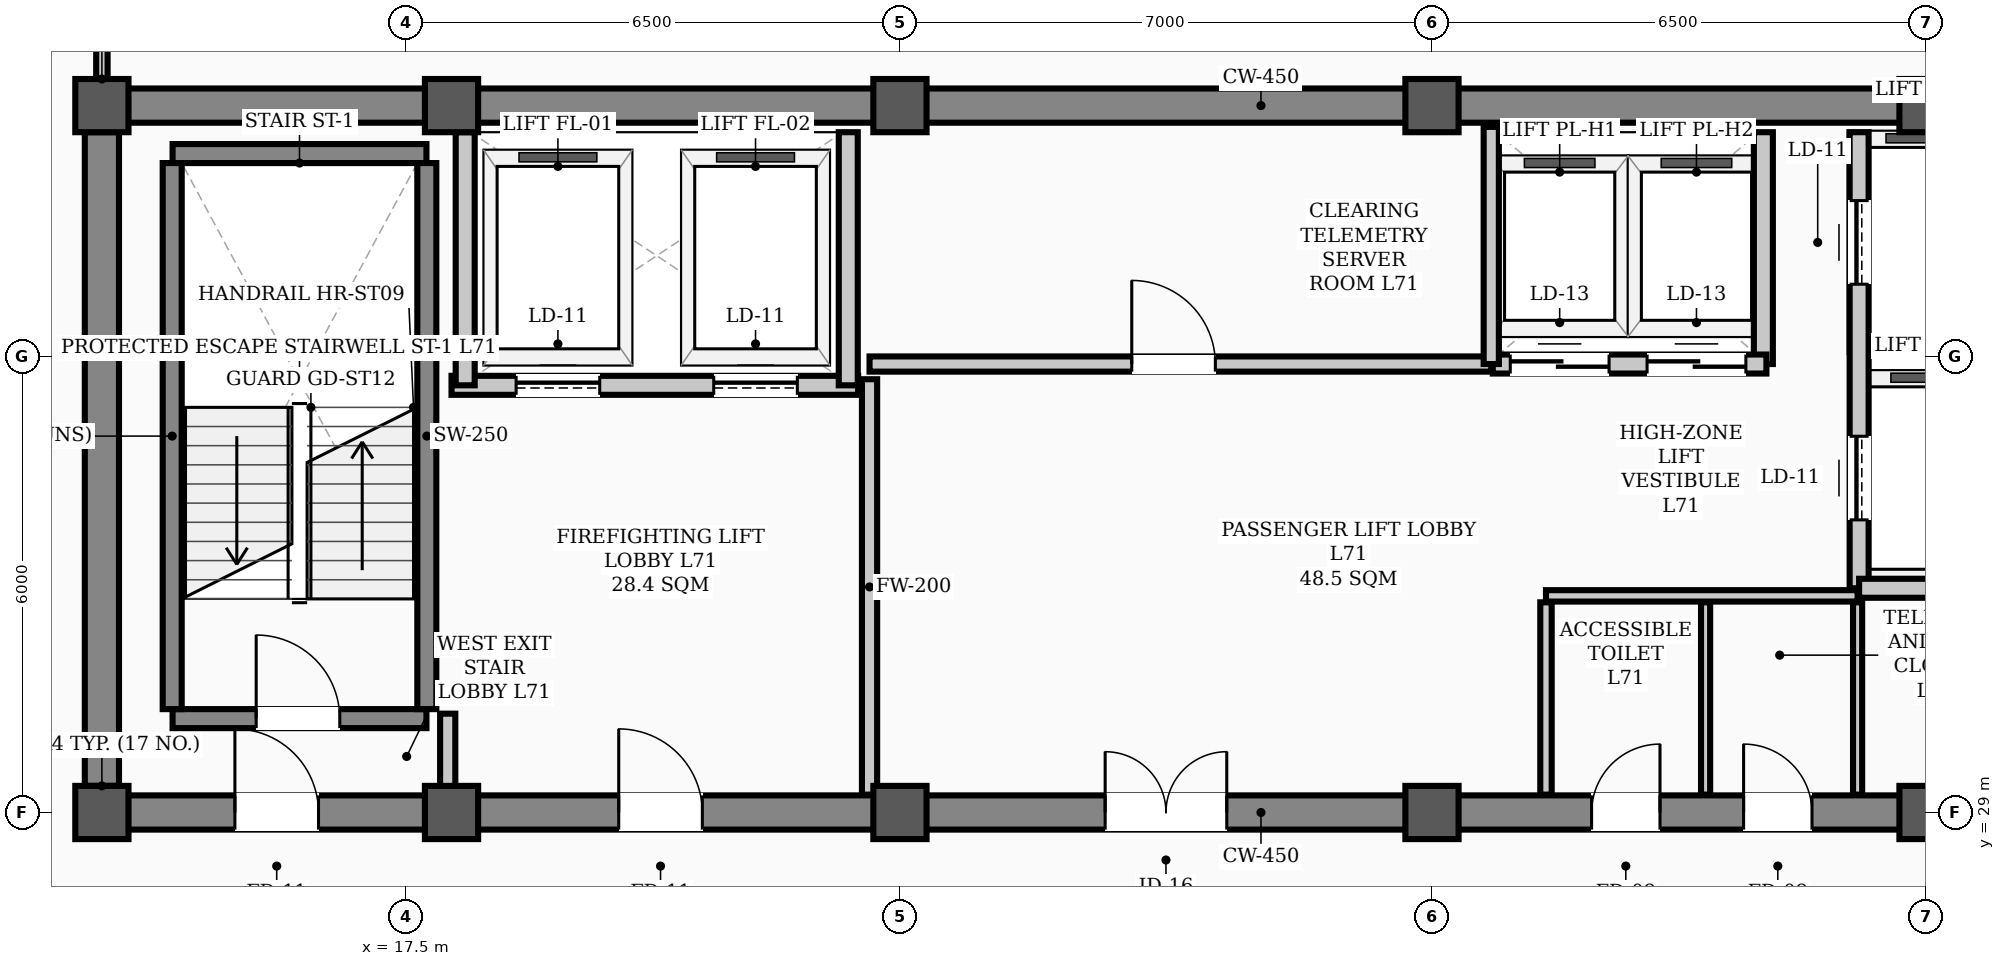
"""IFC4 building model, lengths in metres.
Left out: names, types, materials, properties, quantities, classifications, styles, units other than length and angle.
Written with IfcOpenShell. Run it as: python <this file> out.ifc"""

import sys

from ifc_helpers import new_model, si_unit, direction, frame, frame_2d, origin, origin_2d, place, context, subcontext, project, spatial, rectangle, hollow_rectangle, extrude, element, fill, save


model = new_model("IFC4")
c1 = context("Model", 3, precision=1e-05, world=origin(), true_north=direction((0.0, 1.0)))
c2 = subcontext(c1, "Body", "Model", "MODEL_VIEW")
j1 = project(units=[si_unit("LENGTHUNIT", "METRE"), si_unit("PLANEANGLEUNIT", "RADIAN")], contexts=[c1])
p1 = place(None, origin())
s1 = spatial("IfcSite", under=j1, at=p1, CompositionType="ELEMENT")
p2 = place(p1, origin())
s2 = spatial("IfcBuilding", under=s1, at=p2, CompositionType="ELEMENT")
p3 = place(p2, frame((0.0, 0.0, 285.2)))
s3 = spatial("IfcBuildingStorey", under=s2, at=p3, CompositionType="ELEMENT", Elevation=285.2)
for number, where, z_axis, x_axis in (
    (1, (13.5, 29.0, 0.0), (0.0, 0.0, 1.0), (1.0, 0.0, 0.0)),
    (2, (13.5, 38.3, 0.0), (0.0, 0.0, 1.0), (1.0, 0.0, 0.0)),
    (3, (18.1, 29.0, 0.0), (0.0, 0.0, 1.0), (1.0, 0.0, 0.0)),
    (4, (18.1, 38.3, 0.0), (0.0, 0.0, 1.0), (1.0, 0.0, 0.0)),
    (5, (24.0, 29.0, 0.0), (0.0, 0.0, 1.0), (1.0, 0.0, 0.0)),
    (6, (24.0, 38.3, 0.0), (0.0, 0.0, 1.0), (1.0, 0.0, 0.0)),
    (7, (31.0, 29.0, 0.0), (0.0, 0.0, 1.0), (1.0, 0.0, 0.0)),
    (8, (31.0, 38.3, 0.0), (0.0, 0.0, 1.0), (1.0, 0.0, 0.0)),
    (9, (37.5, 29.0, 0.0), (0.0, 0.0, 1.0), (1.0, 0.0, 0.0)),
    (10, (37.5, 38.3, 0.0), (0.0, 0.0, 1.0), (1.0, 0.0, 0.0)),
):
    element("IfcColumn", number, at=place(p3, frame(where, z_axis=z_axis, x_axis=x_axis)), inside=s3, PredefinedType="COLUMN", context=c2, shape_type="SweptSolid", body=[
        extrude(hollow_rectangle(XDim=0.7, YDim=0.7, WallThickness=0.028, InnerFilletRadius=0.014, OuterFilletRadius=0.042, at=origin_2d()), origin(), (0.0, 0.0, 1.0), 3.9),
    ])
p4 = place(p3, frame((13.5, 29.0, 0.0), z_axis=(0.0, 0.0, 1.0), x_axis=(1.0, 0.0, 0.0)))
e11 = element("IfcWall", 11, at=p4, inside=s3, PredefinedType="SHEAR", context=c2, shape_type="SweptSolid", body=[
    extrude(rectangle(XDim=30.5, YDim=0.45, at=frame_2d((15.25, 0.0))), origin(), (0.0, 0.0, 1.0), 3.72),
])
p5 = place(p4, frame((1.75, 0.0, 0.0)))
e12 = element("IfcOpeningElement", 12, at=p5, cuts=e11, PredefinedType="OPENING", context=c2, shape_type="SweptSolid", body=[
    extrude(rectangle(XDim=1.1, YDim=2.08, at=frame_2d((0.55, 1.04))), frame((0.0, 0.235, 0.0), z_axis=(0.0, -1.0, 0.0), x_axis=(1.0, 0.0, 0.0)), (0.0, 0.0, 1.0), 0.47),
])
p6 = place(p4, frame((26.7, 0.0, 0.0)))
e13 = element("IfcOpeningElement", 13, at=p6, cuts=e11, PredefinedType="OPENING", context=c2, shape_type="SweptSolid", body=[
    extrude(rectangle(XDim=1.1, YDim=2.08, at=frame_2d((0.55, 1.04))), frame((0.0, 0.235, 0.0), z_axis=(0.0, -1.0, 0.0), x_axis=(1.0, 0.0, 0.0)), (0.0, 0.0, 1.0), 0.47),
])
p7 = place(p4, frame((6.8, 0.0, 0.0)))
e14 = element("IfcOpeningElement", 14, at=p7, cuts=e11, PredefinedType="OPENING", context=c2, shape_type="SweptSolid", body=[
    extrude(rectangle(XDim=1.1, YDim=2.08, at=frame_2d((0.55, 1.04))), frame((0.0, 0.235, 0.0), z_axis=(0.0, -1.0, 0.0), x_axis=(1.0, 0.0, 0.0)), (0.0, 0.0, 1.0), 0.47),
])
p8 = place(p4, frame((13.2, 0.0, 0.0)))
e15 = element("IfcOpeningElement", 15, at=p8, cuts=e11, PredefinedType="OPENING", context=c2, shape_type="SweptSolid", body=[
    extrude(rectangle(XDim=1.6, YDim=2.08, at=frame_2d((0.8, 1.04))), frame((0.0, 0.235, 0.0), z_axis=(0.0, -1.0, 0.0), x_axis=(1.0, 0.0, 0.0)), (0.0, 0.0, 1.0), 0.47),
])
p9 = place(p4, frame((19.6, 0.0, 0.0)))
e16 = element("IfcOpeningElement", 16, at=p9, cuts=e11, PredefinedType="OPENING", context=c2, shape_type="SweptSolid", body=[
    extrude(rectangle(XDim=0.9, YDim=2.08, at=frame_2d((0.45, 1.04))), frame((0.0, 0.235, 0.0), z_axis=(0.0, -1.0, 0.0), x_axis=(1.0, 0.0, 0.0)), (0.0, 0.0, 1.0), 0.47),
])
p10 = place(p4, frame((21.6, 0.0, 0.0)))
e17 = element("IfcOpeningElement", 17, at=p10, cuts=e11, PredefinedType="OPENING", context=c2, shape_type="SweptSolid", body=[
    extrude(rectangle(XDim=0.9, YDim=2.08, at=frame_2d((0.45, 1.04))), frame((0.0, 0.235, 0.0), z_axis=(0.0, -1.0, 0.0), x_axis=(1.0, 0.0, 0.0)), (0.0, 0.0, 1.0), 0.47),
])
p11 = place(p3, frame((13.5, 38.3, 0.0), z_axis=(0.0, 0.0, 1.0), x_axis=(1.0, 0.0, 0.0)))
e18 = element("IfcWall", 18, at=p11, inside=s3, PredefinedType="SHEAR", context=c2, shape_type="SweptSolid", body=[
    extrude(rectangle(XDim=30.5, YDim=0.45, at=frame_2d((15.25, 0.0))), origin(), (0.0, 0.0, 1.0), 3.72),
])
p12 = place(p3, frame((13.5, 29.35, 0.0), z_axis=(0.0, 0.0, 1.0), x_axis=(0.0, 1.0, 0.0)))
e19 = element("IfcWall", 19, at=p12, inside=s3, PredefinedType="SHEAR", context=c2, shape_type="SweptSolid", body=[
    extrude(rectangle(XDim=8.6, YDim=0.45, at=frame_2d((4.3, 0.0))), origin(), (0.0, 0.0, 1.0), 3.72),
])
p13 = place(p3, frame((14.43, 30.235, 0.0), z_axis=(0.0, 0.0, 1.0), x_axis=(1.0, 0.0, 0.0)))
e20 = element("IfcWall", 20, at=p13, inside=s3, PredefinedType="STANDARD", context=c2, shape_type="SweptSolid", body=[
    extrude(rectangle(XDim=3.34, YDim=0.25, at=frame_2d((1.67, 0.0))), origin(), (0.0, 0.0, 1.0), 3.72),
])
p14 = place(p13, frame((1.1, 0.0, 0.0)))
e21 = element("IfcOpeningElement", 21, at=p14, cuts=e20, PredefinedType="OPENING", context=c2, shape_type="SweptSolid", body=[
    extrude(rectangle(XDim=1.1, YDim=2.08, at=frame_2d((0.55, 1.04))), frame((0.0, 0.135, 0.0), z_axis=(0.0, -1.0, 0.0), x_axis=(1.0, 0.0, 0.0)), (0.0, 0.0, 1.0), 0.27),
])
p15 = place(p3, frame((14.43, 37.669, 0.0), z_axis=(0.0, 0.0, 1.0), x_axis=(1.0, 0.0, 0.0)))
e22 = element("IfcWall", 22, at=p15, inside=s3, PredefinedType="STANDARD", context=c2, shape_type="SweptSolid", body=[
    extrude(rectangle(XDim=3.34, YDim=0.25, at=frame_2d((1.67, 0.0))), origin(), (0.0, 0.0, 1.0), 3.72),
])
for number, where, z_axis, x_axis in (
    (23, (14.425, 30.36, 0.0), (0.0, 0.0, 1.0), (0.0, 1.0, 0.0)),
    (24, (17.775, 30.36, 0.0), (0.0, 0.0, 1.0), (0.0, 1.0, 0.0)),
):
    element("IfcWall", number, at=place(p3, frame(where, z_axis=z_axis, x_axis=x_axis)), inside=s3, PredefinedType="STANDARD", context=c2, shape_type="SweptSolid", body=[
        extrude(rectangle(XDim=7.184, YDim=0.25, at=frame_2d((3.592, 0.0))), origin(), (0.0, 0.0, 1.0), 3.72),
    ])
p16 = place(p3, frame((18.1, 34.62, 0.0), z_axis=(0.0, 0.0, 1.0), x_axis=(1.0, 0.0, 0.0)))
e25 = element("IfcWall", 25, at=p16, inside=s3, PredefinedType="STANDARD", context=c2, shape_type="SweptSolid", body=[
    extrude(rectangle(XDim=5.35, YDim=0.25, at=frame_2d((2.675, 0.0))), origin(), (0.0, 0.0, 1.0), 3.72),
])
p17 = place(p16, frame((0.85, 0.0, 0.0)))
e26 = element("IfcOpeningElement", 26, at=p17, cuts=e25, PredefinedType="OPENING", context=c2, shape_type="SweptSolid", body=[
    extrude(rectangle(XDim=1.1, YDim=2.08, at=frame_2d((0.55, 1.04))), frame((0.0, 0.135, 0.0), z_axis=(0.0, -1.0, 0.0), x_axis=(1.0, 0.0, 0.0)), (0.0, 0.0, 1.0), 0.27),
])
p18 = place(p16, frame((3.45, 0.0, 0.0)))
e27 = element("IfcOpeningElement", 27, at=p18, cuts=e25, PredefinedType="OPENING", context=c2, shape_type="SweptSolid", body=[
    extrude(rectangle(XDim=1.1, YDim=2.08, at=frame_2d((0.55, 1.04))), frame((0.0, 0.135, 0.0), z_axis=(0.0, -1.0, 0.0), x_axis=(1.0, 0.0, 0.0)), (0.0, 0.0, 1.0), 0.27),
])
p19 = place(p3, frame((36.62, 31.95, 0.0), z_axis=(0.0, 0.0, 1.0), x_axis=(0.0, 1.0, 0.0)))
e28 = element("IfcWall", 28, at=p19, inside=s3, PredefinedType="STANDARD", context=c2, shape_type="SweptSolid", body=[
    extrude(rectangle(XDim=6.0, YDim=0.25, at=frame_2d((3.0, 0.0))), origin(), (0.0, 0.0, 1.0), 3.4),
])
p20 = place(p19, frame((0.9, 0.0, 0.0)))
e29 = element("IfcOpeningElement", 29, at=p20, cuts=e28, PredefinedType="OPENING", context=c2, shape_type="SweptSolid", body=[
    extrude(rectangle(XDim=1.1, YDim=2.08, at=frame_2d((0.55, 1.04))), frame((0.0, 0.135, 0.0), z_axis=(0.0, -1.0, 0.0), x_axis=(1.0, 0.0, 0.0)), (0.0, 0.0, 1.0), 0.27),
])
p21 = place(p19, frame((4.0, 0.0, 0.0)))
e30 = element("IfcOpeningElement", 30, at=p21, cuts=e28, PredefinedType="OPENING", context=c2, shape_type="SweptSolid", body=[
    extrude(rectangle(XDim=1.1, YDim=2.08, at=frame_2d((0.55, 1.04))), frame((0.0, 0.135, 0.0), z_axis=(0.0, -1.0, 0.0), x_axis=(1.0, 0.0, 0.0)), (0.0, 0.0, 1.0), 0.27),
])
p22 = place(p3, frame((36.62, 31.95, 0.0), z_axis=(0.0, 0.0, 1.0), x_axis=(1.0, 0.0, 0.0)))
e31 = element("IfcWall", 31, at=p22, inside=s3, PredefinedType="STANDARD", context=c2, shape_type="SweptSolid", body=[
    extrude(rectangle(XDim=1.9, YDim=0.25, at=frame_2d((0.95, 0.0))), origin(), (0.0, 0.0, 1.0), 3.48),
])
for number, where, z_axis, x_axis in (
    (32, (18.28, 34.62, 0.0), (0.0, 0.0, 1.0), (0.0, 1.0, 0.0)),
    (33, (23.32, 34.62, 0.0), (0.0, 0.0, 1.0), (0.0, 1.0, 0.0)),
):
    element("IfcWall", number, at=place(p3, frame(where, z_axis=z_axis, x_axis=x_axis)), inside=s3, PredefinedType="STANDARD", context=c2, shape_type="SweptSolid", body=[
        extrude(rectangle(XDim=3.33, YDim=0.25, at=frame_2d((1.665, 0.0))), origin(), (0.0, 0.0, 1.0), 3.72),
    ])
p23 = place(p3, frame((35.36, 34.9, 0.0), z_axis=(0.0, 0.0, 1.0), x_axis=(0.0, 1.0, 0.0)))
e34 = element("IfcWall", 34, at=p23, inside=s3, PredefinedType="STANDARD", context=c2, shape_type="SweptSolid", body=[
    extrude(rectangle(XDim=3.05, YDim=0.25, at=frame_2d((1.525, 0.0))), origin(), (0.0, 0.0, 1.0), 3.4),
])
p24 = place(p3, frame((31.8, 34.9, 0.0), z_axis=(0.0, 0.0, 1.0), x_axis=(1.0, 0.0, 0.0)))
e35 = element("IfcWall", 35, at=p24, inside=s3, PredefinedType="STANDARD", context=c2, shape_type="SweptSolid", body=[
    extrude(rectangle(XDim=3.6, YDim=0.25, at=frame_2d((1.8, 0.0))), origin(), (0.0, 0.0, 1.0), 3.72),
])
p25 = place(p24, frame((0.23, 0.0, 0.0)))
e36 = element("IfcOpeningElement", 36, at=p25, cuts=e35, PredefinedType="OPENING", context=c2, shape_type="SweptSolid", body=[
    extrude(rectangle(XDim=1.3, YDim=2.08, at=frame_2d((0.65, 1.04))), frame((0.0, 0.135, 0.0), z_axis=(0.0, -1.0, 0.0), x_axis=(1.0, 0.0, 0.0)), (0.0, 0.0, 1.0), 0.27),
])
p26 = place(p24, frame((2.03, 0.0, 0.0)))
e37 = element("IfcOpeningElement", 37, at=p26, cuts=e35, PredefinedType="OPENING", context=c2, shape_type="SweptSolid", body=[
    extrude(rectangle(XDim=1.3, YDim=2.08, at=frame_2d((0.65, 1.04))), frame((0.0, 0.135, 0.0), z_axis=(0.0, -1.0, 0.0), x_axis=(1.0, 0.0, 0.0)), (0.0, 0.0, 1.0), 0.27),
])
p27 = place(p3, frame((23.6, 34.9, 0.0), z_axis=(0.0, 0.0, 1.0), x_axis=(1.0, 0.0, 0.0)))
e38 = element("IfcWall", 38, at=p27, inside=s3, PredefinedType="STANDARD", context=c2, shape_type="SweptSolid", body=[
    extrude(rectangle(XDim=8.18, YDim=0.2, at=frame_2d((4.09, 0.0))), origin(), (0.0, 0.0, 1.0), 3.72),
])
p28 = place(p27, frame((3.45, 0.0, 0.0)))
e39 = element("IfcOpeningElement", 39, at=p28, cuts=e38, PredefinedType="OPENING", context=c2, shape_type="SweptSolid", body=[
    extrude(rectangle(XDim=1.1, YDim=2.08, at=frame_2d((0.55, 1.04))), frame((0.0, 0.11, 0.0), z_axis=(0.0, -1.0, 0.0), x_axis=(1.0, 0.0, 0.0)), (0.0, 0.0, 1.0), 0.22),
])
p29 = place(p3, frame((32.5, 31.85, 0.0), z_axis=(0.0, 0.0, 1.0), x_axis=(1.0, 0.0, 0.0)))
e40 = element("IfcWall", 40, at=p29, inside=s3, PredefinedType="PARTITIONING", context=c2, shape_type="SweptSolid", body=[
    extrude(rectangle(XDim=4.1, YDim=0.15, at=frame_2d((2.05, 0.0))), origin(), (0.0, 0.0, 1.0), 3.72),
])
p30 = place(p3, frame((18.05, 29.235, 0.0), z_axis=(0.0, 0.0, 1.0), x_axis=(0.0, 1.0, 0.0)))
e41 = element("IfcWall", 41, at=p30, inside=s3, PredefinedType="STANDARD", context=c2, shape_type="SweptSolid", body=[
    extrude(rectangle(XDim=1.065, YDim=0.2, at=frame_2d((0.532, 0.0))), origin(), (0.0, 0.0, 1.0), 3.72),
])
p31 = place(p3, frame((23.6, 29.235, 0.0), z_axis=(0.0, 0.0, 1.0), x_axis=(0.0, 1.0, 0.0)))
e42 = element("IfcWall", 42, at=p31, inside=s3, PredefinedType="STANDARD", context=c2, shape_type="SweptSolid", body=[
    extrude(rectangle(XDim=5.465, YDim=0.2, at=frame_2d((2.732, 0.0))), origin(), (0.0, 0.0, 1.0), 3.2),
])
p32 = place(p3, frame((32.5, 29.235, 0.0), z_axis=(0.0, 0.0, 1.0), x_axis=(0.0, 1.0, 0.0)))
e43 = element("IfcWall", 43, at=p32, inside=s3, PredefinedType="PARTITIONING", context=c2, shape_type="SweptSolid", body=[
    extrude(rectangle(XDim=2.53, YDim=0.15, at=frame_2d((1.265, 0.0))), origin(), (0.0, 0.0, 1.0), 3.4),
])
for number, where, z_axis, x_axis in (
    (44, (36.6, 29.235, 0.0), (0.0, 0.0, 1.0), (0.0, 1.0, 0.0)),
    (45, (34.6, 29.235, 0.0), (0.0, 0.0, 1.0), (0.0, 1.0, 0.0)),
):
    element("IfcWall", number, at=place(p3, frame(where, z_axis=z_axis, x_axis=x_axis)), inside=s3, PredefinedType="PARTITIONING", context=c2, shape_type="SweptSolid", body=[
        extrude(rectangle(XDim=2.53, YDim=0.12, at=frame_2d((1.265, 0.0))), origin(), (0.0, 0.0, 1.0), 3.4),
    ])
p33 = place(p3, frame((13.5, 38.535, 0.0), z_axis=(0.0, 0.0, 1.0), x_axis=(0.0, 1.0, 0.0)))
e46 = element("IfcWall", 46, at=p33, inside=s3, PredefinedType="PARTITIONING", context=c2, shape_type="SweptSolid", body=[
    extrude(rectangle(XDim=2.405, YDim=0.15, at=frame_2d((1.203, 0.0))), origin(), (0.0, 0.0, 1.0), 3.72),
])
p34 = place(p3, frame((31.78, 34.9, 0.0), z_axis=(0.0, 0.0, 1.0), x_axis=(0.0, 1.0, 0.0)))
e47 = element("IfcWall", 47, at=p34, inside=s3, PredefinedType="STANDARD", context=c2, shape_type="SweptSolid", body=[
    extrude(rectangle(XDim=3.12, YDim=0.2, at=frame_2d((1.56, 0.0))), origin(), (0.0, 0.0, 1.0), 3.4),
])
p35 = place(p14, origin())
e48 = element("IfcDoor", 48, at=p35, inside=s3, OperationType="SINGLE_SWING_LEFT", PredefinedType="DOOR", context=c2, shape_type="SweptSolid", body=[
    extrude(rectangle(XDim=1.1, YDim=2.08, at=frame_2d((0.55, 1.04))), frame((0.0, 0.025, 0.0), z_axis=(0.0, -1.0, 0.0), x_axis=(1.0, 0.0, 0.0)), (0.0, 0.0, 1.0), 0.05),
])
fill(e21, e48)
p36 = place(p5, origin())
e49 = element("IfcDoor", 49, at=p36, inside=s3, OperationType="SINGLE_SWING_LEFT", PredefinedType="DOOR", context=c2, shape_type="SweptSolid", body=[
    extrude(rectangle(XDim=1.1, YDim=2.08, at=frame_2d((0.55, 1.04))), frame((0.0, 0.025, 0.0), z_axis=(0.0, -1.0, 0.0), x_axis=(1.0, 0.0, 0.0)), (0.0, 0.0, 1.0), 0.05),
])
fill(e12, e49)
p37 = place(p7, origin())
e50 = element("IfcDoor", 50, at=p37, inside=s3, OperationType="SINGLE_SWING_LEFT", PredefinedType="DOOR", context=c2, shape_type="SweptSolid", body=[
    extrude(rectangle(XDim=1.1, YDim=2.08, at=frame_2d((0.55, 1.04))), frame((0.0, 0.025, 0.0), z_axis=(0.0, -1.0, 0.0), x_axis=(1.0, 0.0, 0.0)), (0.0, 0.0, 1.0), 0.05),
])
fill(e14, e50)
p38 = place(p8, origin())
e51 = element("IfcDoor", 51, at=p38, inside=s3, OperationType="DOUBLE_DOOR_SINGLE_SWING", PredefinedType="DOOR", context=c2, shape_type="SweptSolid", body=[
    extrude(rectangle(XDim=1.6, YDim=2.08, at=frame_2d((0.8, 1.04))), frame((0.0, 0.025, 0.0), z_axis=(0.0, -1.0, 0.0), x_axis=(1.0, 0.0, 0.0)), (0.0, 0.0, 1.0), 0.05),
])
fill(e15, e51)
p39 = place(p28, origin())
e52 = element("IfcDoor", 52, at=p39, inside=s3, OperationType="SINGLE_SWING_LEFT", PredefinedType="DOOR", context=c2, shape_type="SweptSolid", body=[
    extrude(rectangle(XDim=1.1, YDim=2.08, at=frame_2d((0.55, 1.04))), frame((0.0, 0.025, 0.0), z_axis=(0.0, -1.0, 0.0), x_axis=(1.0, 0.0, 0.0)), (0.0, 0.0, 1.0), 0.05),
])
fill(e39, e52)
p40 = place(p9, origin())
e53 = element("IfcDoor", 53, at=p40, inside=s3, OperationType="SINGLE_SWING_RIGHT", PredefinedType="DOOR", context=c2, shape_type="SweptSolid", body=[
    extrude(rectangle(XDim=0.9, YDim=2.08, at=frame_2d((0.45, 1.04))), frame((0.0, 0.025, 0.0), z_axis=(0.0, -1.0, 0.0), x_axis=(1.0, 0.0, 0.0)), (0.0, 0.0, 1.0), 0.05),
])
fill(e16, e53)
p41 = place(p10, origin())
e54 = element("IfcDoor", 54, at=p41, inside=s3, OperationType="SINGLE_SWING_LEFT", PredefinedType="DOOR", context=c2, shape_type="SweptSolid", body=[
    extrude(rectangle(XDim=0.9, YDim=2.08, at=frame_2d((0.45, 1.04))), frame((0.0, 0.025, 0.0), z_axis=(0.0, -1.0, 0.0), x_axis=(1.0, 0.0, 0.0)), (0.0, 0.0, 1.0), 0.05),
])
fill(e17, e54)
p42 = place(p17, origin())
e55 = element("IfcDoor", 55, at=p42, inside=s3, OperationType="SLIDING_TO_LEFT", PredefinedType="DOOR", context=c2, shape_type="SweptSolid", body=[
    extrude(rectangle(XDim=1.1, YDim=2.08, at=frame_2d((0.55, 1.04))), frame((0.0, 0.025, 0.0), z_axis=(0.0, -1.0, 0.0), x_axis=(1.0, 0.0, 0.0)), (0.0, 0.0, 1.0), 0.05),
])
fill(e26, e55)
p43 = place(p18, origin())
e56 = element("IfcDoor", 56, at=p43, inside=s3, OperationType="SLIDING_TO_LEFT", PredefinedType="DOOR", context=c2, shape_type="SweptSolid", body=[
    extrude(rectangle(XDim=1.1, YDim=2.08, at=frame_2d((0.55, 1.04))), frame((0.0, 0.025, 0.0), z_axis=(0.0, -1.0, 0.0), x_axis=(1.0, 0.0, 0.0)), (0.0, 0.0, 1.0), 0.05),
])
fill(e27, e56)
p44 = place(p20, origin())
e57 = element("IfcDoor", 57, at=p44, inside=s3, OperationType="SLIDING_TO_LEFT", PredefinedType="DOOR", context=c2, shape_type="SweptSolid", body=[
    extrude(rectangle(XDim=1.1, YDim=2.08, at=frame_2d((0.55, 1.04))), frame((0.0, 0.025, 0.0), z_axis=(0.0, -1.0, 0.0), x_axis=(1.0, 0.0, 0.0)), (0.0, 0.0, 1.0), 0.05),
])
fill(e29, e57)
p45 = place(p21, origin())
e58 = element("IfcDoor", 58, at=p45, inside=s3, OperationType="SLIDING_TO_LEFT", PredefinedType="DOOR", context=c2, shape_type="SweptSolid", body=[
    extrude(rectangle(XDim=1.1, YDim=2.08, at=frame_2d((0.55, 1.04))), frame((0.0, 0.025, 0.0), z_axis=(0.0, -1.0, 0.0), x_axis=(1.0, 0.0, 0.0)), (0.0, 0.0, 1.0), 0.05),
])
fill(e30, e58)
p46 = place(p25, origin())
e59 = element("IfcDoor", 59, at=p46, inside=s3, OperationType="DOUBLE_DOOR_SLIDING", PredefinedType="DOOR", context=c2, shape_type="SweptSolid", body=[
    extrude(rectangle(XDim=1.3, YDim=2.08, at=frame_2d((0.65, 1.04))), frame((0.0, 0.025, 0.0), z_axis=(0.0, -1.0, 0.0), x_axis=(1.0, 0.0, 0.0)), (0.0, 0.0, 1.0), 0.05),
])
fill(e36, e59)
p47 = place(p26, origin())
e60 = element("IfcDoor", 60, at=p47, inside=s3, OperationType="DOUBLE_DOOR_SLIDING", PredefinedType="DOOR", context=c2, shape_type="SweptSolid", body=[
    extrude(rectangle(XDim=1.3, YDim=2.08, at=frame_2d((0.65, 1.04))), frame((0.0, 0.025, 0.0), z_axis=(0.0, -1.0, 0.0), x_axis=(1.0, 0.0, 0.0)), (0.0, 0.0, 1.0), 0.05),
])
fill(e37, e60)
save(model, sys.argv[1])
